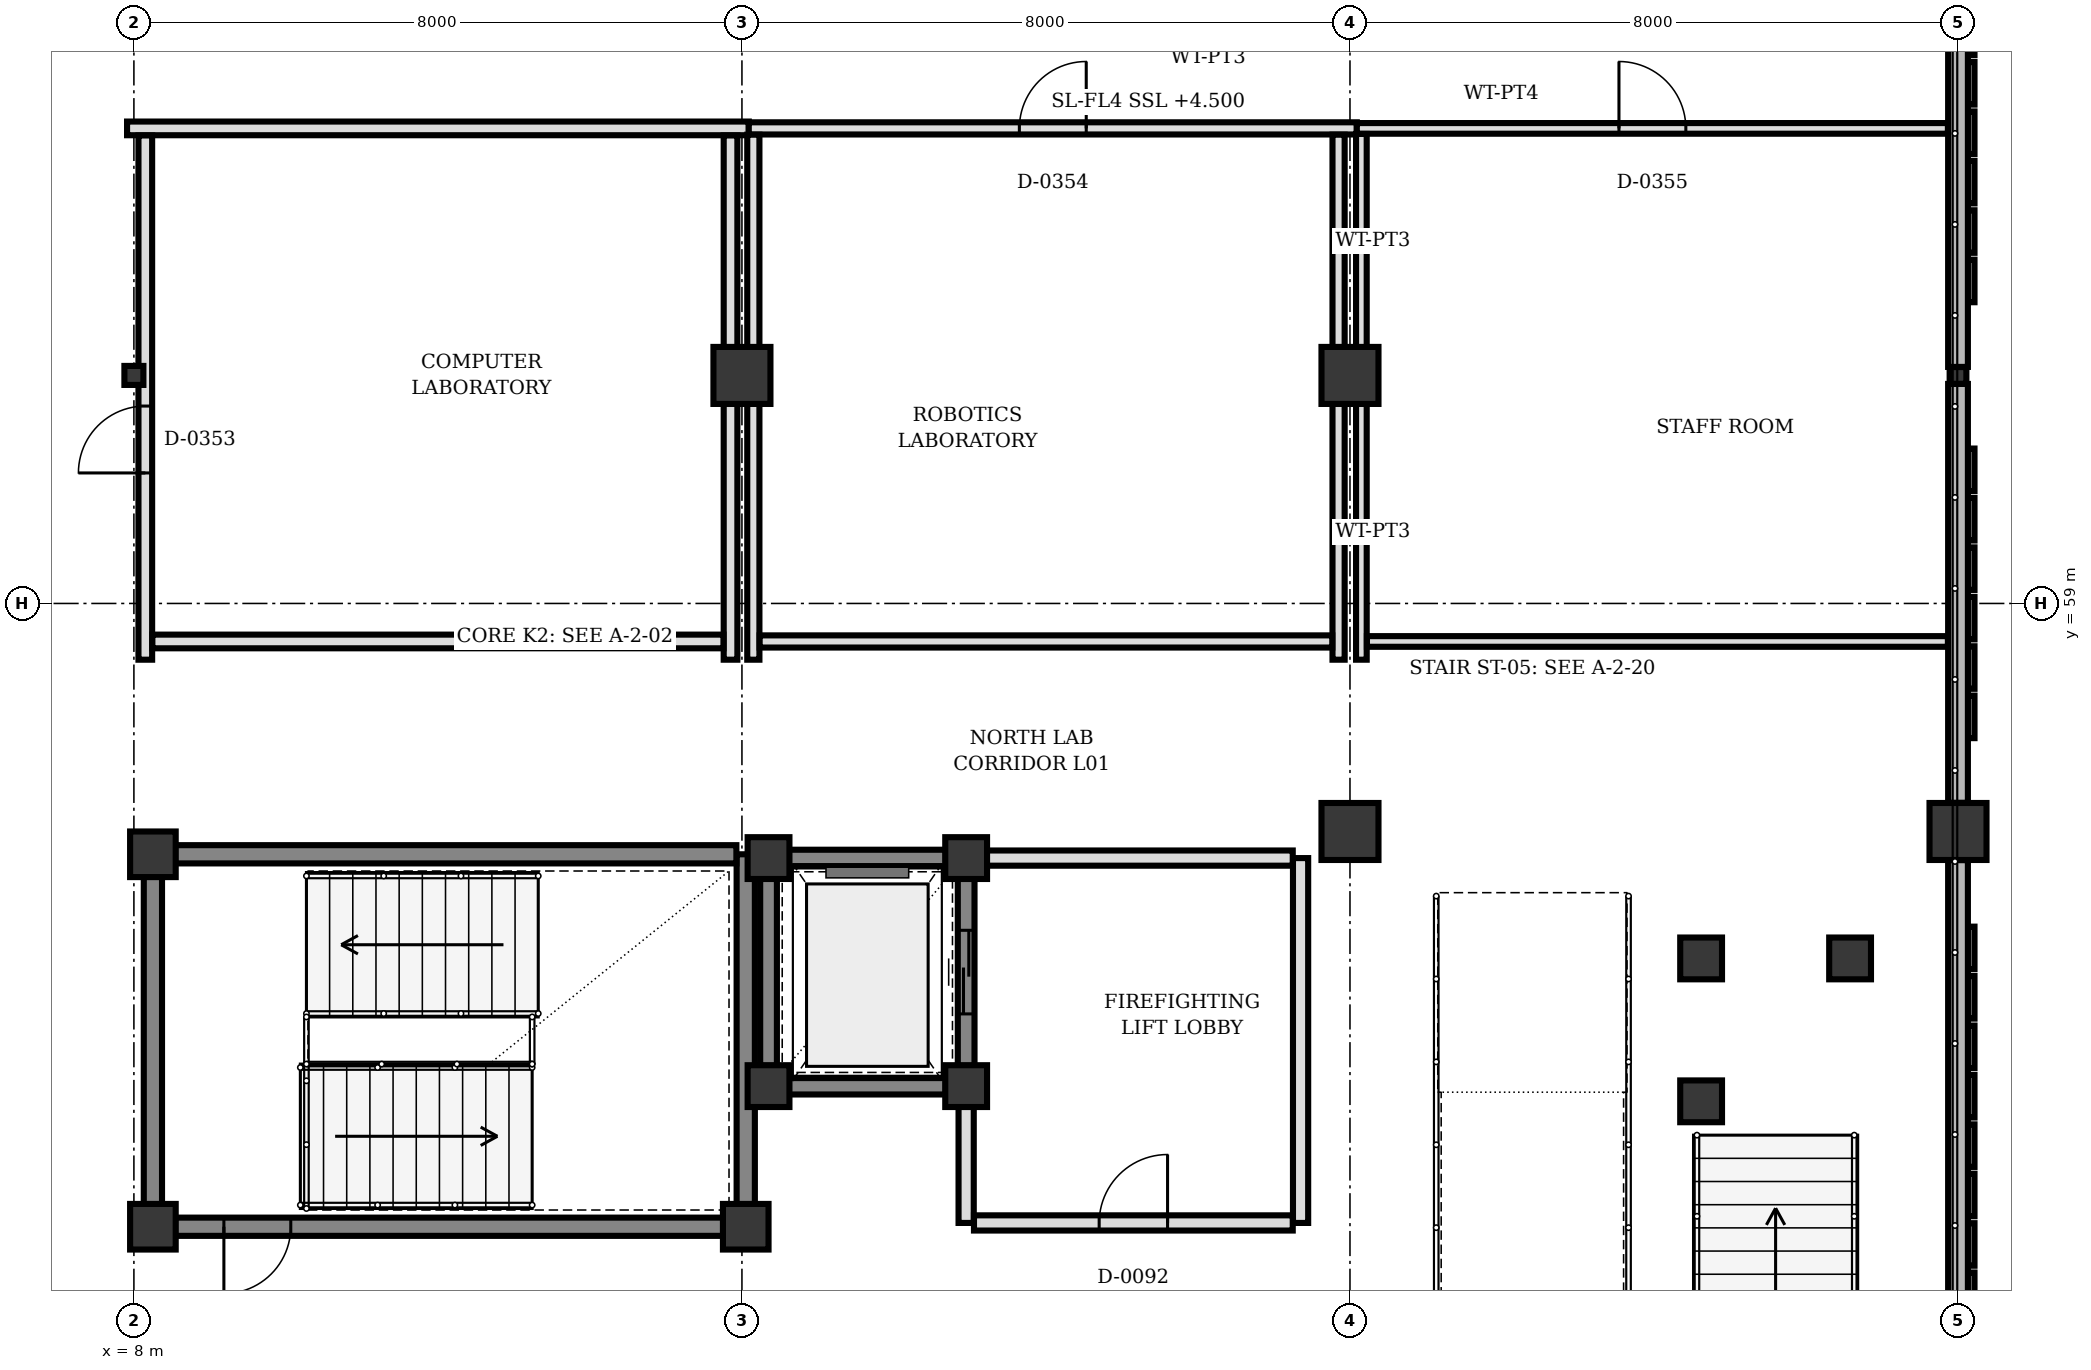
"""IFC4 building model, lengths in metres.
Left out: names, types, materials, properties, quantities, classifications, styles, units other than length and angle.
Written with IfcOpenShell. Run it as: python <this file> out.ifc"""

import sys

from ifc_helpers import new_model, si_unit, direction, frame, frame_2d, origin, origin_2d, place, context, subcontext, project, spatial, rectangle, hollow_rectangle, extrude, element, fill, save


model = new_model("IFC4")
c1 = context("Model", 3, precision=1e-05, world=origin(), true_north=direction((0.0, 1.0)))
c2 = subcontext(c1, "Body", "Model", "MODEL_VIEW")
j1 = project(units=[si_unit("LENGTHUNIT", "METRE"), si_unit("PLANEANGLEUNIT", "RADIAN")], contexts=[c1])
p1 = place(None, origin())
s1 = spatial("IfcSite", under=j1, at=p1, CompositionType="ELEMENT")
p2 = place(p1, origin())
s2 = spatial("IfcBuilding", under=s1, at=p2, CompositionType="ELEMENT")
p3 = place(p2, frame((0.0, 0.0, 4.5)))
s3 = spatial("IfcBuildingStorey", under=s2, at=p3, CompositionType="ELEMENT", Elevation=4.5)
for number, where, z_axis, x_axis in (
    (1, (8.25, 50.8, 0.0), (0.0, 0.0, 1.0), (1.0, 0.0, 0.0)),
    (2, (16.05, 50.8, 0.0), (0.0, 0.0, 1.0), (1.0, 0.0, 0.0)),
    (3, (8.25, 55.7, 0.0), (0.0, 0.0, 1.0), (1.0, 0.0, 0.0)),
):
    element("IfcColumn", number, at=place(p3, frame(where, z_axis=z_axis, x_axis=x_axis)), inside=s3, PredefinedType="COLUMN", context=c2, shape_type="SweptSolid", body=[
        extrude(rectangle(XDim=0.6, YDim=0.6, at=origin_2d()), origin(), (0.0, 0.0, 1.0), 4.0),
    ])
for number, where, z_axis, x_axis in (
    (4, (28.62, 54.33, 0.0), (0.0, 0.0, 1.0), (1.0, 0.0, 0.0)),
    (5, (30.58, 54.33, 0.0), (0.0, 0.0, 1.0), (1.0, 0.0, 0.0)),
    (6, (28.62, 52.45, 0.0), (0.0, 0.0, 1.0), (1.0, 0.0, 0.0)),
):
    element("IfcColumn", number, at=place(p3, frame(where, z_axis=z_axis, x_axis=x_axis)), inside=s3, PredefinedType="COLUMN", context=c2, shape_type="SweptSolid", body=[
        extrude(rectangle(XDim=0.55, YDim=0.55, at=origin_2d()), origin(), (0.0, 0.0, 1.0), 3.85),
    ])
for number, where, z_axis, x_axis in (
    (7, (16.35, 52.65, 0.0), (0.0, 0.0, 1.0), (1.0, 0.0, 0.0)),
    (8, (18.95, 52.65, 0.0), (0.0, 0.0, 1.0), (1.0, 0.0, 0.0)),
    (9, (18.95, 55.65, 0.0), (0.0, 0.0, 1.0), (1.0, 0.0, 0.0)),
    (10, (16.35, 55.65, 0.0), (0.0, 0.0, 1.0), (1.0, 0.0, 0.0)),
):
    element("IfcColumn", number, at=place(p3, frame(where, z_axis=z_axis, x_axis=x_axis)), inside=s3, PredefinedType="COLUMN", context=c2, shape_type="SweptSolid", body=[
        extrude(rectangle(XDim=0.55, YDim=0.55, at=origin_2d()), origin(), (0.0, 0.0, 1.0), 4.0),
    ])
for number, where, z_axis, x_axis in (
    (11, (16.0, 62.0, 0.0), (0.0, 0.0, 1.0), (1.0, 0.0, 0.0)),
    (12, (24.0, 56.0, 0.0), (0.0, 0.0, 1.0), (1.0, 0.0, 0.0)),
    (13, (24.0, 62.0, 0.0), (0.0, 0.0, 1.0), (1.0, 0.0, 0.0)),
    (14, (32.0, 56.0, 0.0), (0.0, 0.0, 1.0), (1.0, 0.0, 0.0)),
):
    element("IfcColumn", number, at=place(p3, frame(where, z_axis=z_axis, x_axis=x_axis)), inside=s3, PredefinedType="COLUMN", context=c2, shape_type="SweptSolid", body=[
        extrude(rectangle(XDim=0.75, YDim=0.75, at=origin_2d()), origin(), (0.0, 0.0, 1.0), 4.0),
    ])
p4 = place(p3, frame((32.0, 62.0, 0.0), z_axis=(0.0, 0.0, 1.0), x_axis=(1.0, 0.0, 0.0)))
e15 = element("IfcColumn", 15, at=p4, inside=s3, PredefinedType="COLUMN", context=c2, shape_type="SweptSolid", body=[
    extrude(hollow_rectangle(XDim=0.22, YDim=0.22, WallThickness=0.01, at=origin_2d()), origin(), (0.0, 0.0, 1.0), 4.0),
])
p5 = place(p3, frame((8.0, 62.0, 0.0), z_axis=(0.0, 0.0, 1.0), x_axis=(1.0, 0.0, 0.0)))
e16 = element("IfcColumn", 16, at=p5, inside=s3, PredefinedType="COLUMN", context=c2, shape_type="SweptSolid", body=[
    extrude(hollow_rectangle(XDim=0.25, YDim=0.25, WallThickness=0.01, at=origin_2d()), origin(), (0.0, 0.0, 1.0), 4.0),
])
for number, where, z_axis, x_axis in (
    (17, (32.0, 67.623, 0.0), (0.0, 0.0, 1.0), (0.0, -1.0, 0.0)),
    (18, (32.0, 61.888, 0.0), (0.0, 0.0, 1.0), (0.0, -1.0, 0.0)),
):
    element("IfcWall", number, at=place(p3, frame(where, z_axis=z_axis, x_axis=x_axis)), inside=s3, PredefinedType="SOLIDWALL", context=c2, shape_type="SweptSolid", body=[
        extrude(rectangle(XDim=5.511, YDim=0.26, at=frame_2d((2.755, 0.0))), origin(), (0.0, 0.0, 1.0), 2.982),
    ])
p6 = place(p3, frame((32.0, 55.623, 0.0), z_axis=(0.0, 0.0, 1.0), x_axis=(0.0, -1.0, 0.0)))
e19 = element("IfcWall", 19, at=p6, inside=s3, PredefinedType="SOLIDWALL", context=c2, shape_type="SweptSolid", body=[
    extrude(rectangle(XDim=7.511, YDim=0.26, at=frame_2d((3.755, 0.0))), origin(), (0.0, 0.0, 1.0), 3.132),
])
p7 = place(p3, frame((8.25, 51.092, 0.0), z_axis=(0.0, 0.0, 1.0), x_axis=(0.0, 1.0, 0.0)))
e20 = element("IfcWall", 20, at=p7, inside=s3, PredefinedType="SHEAR", context=c2, shape_type="SweptSolid", body=[
    extrude(rectangle(XDim=4.316, YDim=0.24, at=frame_2d((2.158, 0.0))), origin(), (0.0, 0.0, 1.0), 3.74),
])
p8 = place(p3, frame((16.05, 55.7, 0.0), z_axis=(0.0, 0.0, 1.0), x_axis=(0.0, -1.0, 0.0)))
e21 = element("IfcWall", 21, at=p8, inside=s3, PredefinedType="SHEAR", context=c2, shape_type="SweptSolid", body=[
    extrude(rectangle(XDim=4.608, YDim=0.24, at=frame_2d((2.304, 0.0))), origin(), (0.0, 0.0, 1.0), 3.74),
])
p9 = place(p3, frame((15.758, 50.8, 0.0), z_axis=(0.0, 0.0, 1.0), x_axis=(-1.0, 0.0, 0.0)))
e22 = element("IfcWall", 22, at=p9, inside=s3, PredefinedType="SHEAR", context=c2, shape_type="SweptSolid", body=[
    extrude(rectangle(XDim=7.216, YDim=0.24, at=frame_2d((3.608, 0.0))), origin(), (0.0, 0.0, 1.0), 3.74),
])
p10 = place(p9, frame((5.694, 0.0, 0.0)))
e23 = element("IfcOpeningElement", 23, at=p10, cuts=e22, PredefinedType="OPENING", context=c2, shape_type="SweptSolid", body=[
    extrude(rectangle(XDim=0.88, YDim=2.1, at=frame_2d((0.44, 1.05))), frame((0.0, 0.13, 0.0), z_axis=(0.0, -1.0, 0.0), x_axis=(1.0, 0.0, 0.0)), (0.0, 0.0, 1.0), 0.26),
])
p11 = place(p3, frame((15.927, 55.7, 0.0), z_axis=(0.0, 0.0, 1.0), x_axis=(-1.0, 0.0, 0.0)))
e24 = element("IfcWall", 24, at=p11, inside=s3, PredefinedType="SHEAR", context=c2, shape_type="SweptSolid", body=[
    extrude(rectangle(XDim=7.385, YDim=0.24, at=frame_2d((3.692, 0.0))), origin(), (0.0, 0.0, 1.0), 3.74),
])
p12 = place(p3, frame((16.617, 52.65, 0.0), z_axis=(0.0, 0.0, 1.0), x_axis=(1.0, 0.0, 0.0)))
e25 = element("IfcWall", 25, at=p12, inside=s3, PredefinedType="SHEAR", context=c2, shape_type="SweptSolid", body=[
    extrude(rectangle(XDim=2.066, YDim=0.22, at=frame_2d((1.033, 0.0))), origin(), (0.0, 0.0, 1.0), 3.74),
])
p13 = place(p3, frame((18.95, 52.917, 0.0), z_axis=(0.0, 0.0, 1.0), x_axis=(0.0, 1.0, 0.0)))
e26 = element("IfcWall", 26, at=p13, inside=s3, PredefinedType="SHEAR", context=c2, shape_type="SweptSolid", body=[
    extrude(rectangle(XDim=2.466, YDim=0.22, at=frame_2d((1.233, 0.0))), origin(), (0.0, 0.0, 1.0), 3.74),
])
p14 = place(p13, frame((0.683, 0.0, 0.0)))
e27 = element("IfcOpeningElement", 27, at=p14, cuts=e26, PredefinedType="OPENING", context=c2, shape_type="SweptSolid", body=[
    extrude(rectangle(XDim=1.1, YDim=2.15, at=frame_2d((0.55, 1.075))), frame((0.0, 0.12, 0.0), z_axis=(0.0, -1.0, 0.0), x_axis=(1.0, 0.0, 0.0)), (0.0, 0.0, 1.0), 0.24),
])
p15 = place(p3, frame((18.683, 55.65, 0.0), z_axis=(0.0, 0.0, 1.0), x_axis=(-1.0, 0.0, 0.0)))
e28 = element("IfcWall", 28, at=p15, inside=s3, PredefinedType="SHEAR", context=c2, shape_type="SweptSolid", body=[
    extrude(rectangle(XDim=2.066, YDim=0.22, at=frame_2d((1.033, 0.0))), origin(), (0.0, 0.0, 1.0), 3.74),
])
p16 = place(p3, frame((16.35, 55.383, 0.0), z_axis=(0.0, 0.0, 1.0), x_axis=(0.0, -1.0, 0.0)))
e29 = element("IfcWall", 29, at=p16, inside=s3, PredefinedType="SHEAR", context=c2, shape_type="SweptSolid", body=[
    extrude(rectangle(XDim=2.466, YDim=0.22, at=frame_2d((1.233, 0.0))), origin(), (0.0, 0.0, 1.0), 3.74),
])
p17 = place(p3, frame((18.95, 50.85, 0.0), z_axis=(0.0, 0.0, 1.0), x_axis=(0.0, 1.0, 0.0)))
e30 = element("IfcWall", 30, at=p17, inside=s3, PredefinedType="PARTITIONING", context=c2, shape_type="SweptSolid", body=[
    extrude(rectangle(XDim=1.533, YDim=0.2, at=frame_2d((0.767, 0.0))), origin(), (0.0, 0.0, 1.0), 3.7),
])
p18 = place(p3, frame((23.35, 50.85, 0.0), z_axis=(0.0, 0.0, 1.0), x_axis=(0.0, 1.0, 0.0)))
e31 = element("IfcWall", 31, at=p18, inside=s3, PredefinedType="PARTITIONING", context=c2, shape_type="SweptSolid", body=[
    extrude(rectangle(XDim=4.8, YDim=0.2, at=frame_2d((2.4, 0.0))), origin(), (0.0, 0.0, 1.0), 3.7),
])
p19 = place(p3, frame((19.217, 55.65, 0.0), z_axis=(0.0, 0.0, 1.0), x_axis=(1.0, 0.0, 0.0)))
e32 = element("IfcWall", 32, at=p19, inside=s3, PredefinedType="PARTITIONING", context=c2, shape_type="SweptSolid", body=[
    extrude(rectangle(XDim=4.03, YDim=0.2, at=frame_2d((2.015, 0.0))), origin(), (0.0, 0.0, 1.0), 3.7),
])
p20 = place(p3, frame((19.053, 50.85, 0.0), z_axis=(0.0, 0.0, 1.0), x_axis=(1.0, 0.0, 0.0)))
e33 = element("IfcWall", 33, at=p20, inside=s3, PredefinedType="PARTITIONING", context=c2, shape_type="SweptSolid", body=[
    extrude(rectangle(XDim=4.194, YDim=0.2, at=frame_2d((2.097, 0.0))), origin(), (0.0, 0.0, 1.0), 3.7),
])
p21 = place(p20, frame((1.647, 0.0, 0.0)))
e34 = element("IfcOpeningElement", 34, at=p21, cuts=e33, PredefinedType="OPENING", context=c2, shape_type="SweptSolid", body=[
    extrude(rectangle(XDim=0.9, YDim=2.2, at=frame_2d((0.45, 1.1))), frame((0.0, 0.11, 0.0), z_axis=(0.0, -1.0, 0.0), x_axis=(1.0, 0.0, 0.0)), (0.0, 0.0, 1.0), 0.22),
])
p22 = place(p3, frame((7.91, 65.25, 0.0), z_axis=(0.0, 0.0, 1.0), x_axis=(1.0, 0.0, 0.0)))
e35 = element("IfcWall", 35, at=p22, inside=s3, PredefinedType="PARTITIONING", context=c2, shape_type="SweptSolid", body=[
    extrude(rectangle(XDim=8.18, YDim=0.18, at=frame_2d((4.09, 0.0))), origin(), (0.0, 0.0, 1.0), 3.132),
])
p23 = place(p3, frame((15.85, 65.157, 0.0), z_axis=(0.0, 0.0, 1.0), x_axis=(0.0, -1.0, 0.0)))
e36 = element("IfcWall", 36, at=p23, inside=s3, PredefinedType="PARTITIONING", context=c2, shape_type="SweptSolid", body=[
    extrude(rectangle(XDim=2.79, YDim=0.18, at=frame_2d((1.395, 0.0))), origin(), (0.0, 0.0, 1.0), 3.132),
])
p24 = place(p3, frame((15.85, 61.633, 0.0), z_axis=(0.0, 0.0, 1.0), x_axis=(0.0, -1.0, 0.0)))
e37 = element("IfcWall", 37, at=p24, inside=s3, PredefinedType="PARTITIONING", context=c2, shape_type="SweptSolid", body=[
    extrude(rectangle(XDim=3.373, YDim=0.18, at=frame_2d((1.687, 0.0))), origin(), (0.0, 0.0, 1.0), 3.7),
])
p25 = place(p3, frame((8.15, 58.26, 0.0), z_axis=(0.0, 0.0, 1.0), x_axis=(0.0, 1.0, 0.0)))
e38 = element("IfcWall", 38, at=p25, inside=s3, PredefinedType="PARTITIONING", context=c2, shape_type="SweptSolid", body=[
    extrude(rectangle(XDim=6.897, YDim=0.18, at=frame_2d((3.448, 0.0))), origin(), (0.0, 0.0, 1.0), 2.982),
])
p26 = place(p25, frame((2.457, 0.0, 0.0)))
e39 = element("IfcOpeningElement", 39, at=p26, cuts=e38, PredefinedType="OPENING", context=c2, shape_type="SweptSolid", body=[
    extrude(rectangle(XDim=0.88, YDim=2.1, at=frame_2d((0.44, 1.05))), frame((0.0, 0.1, 0.0), z_axis=(0.0, -1.0, 0.0), x_axis=(1.0, 0.0, 0.0)), (0.0, 0.0, 1.0), 0.2),
])
p27 = place(p3, frame((15.757, 58.5, 0.0), z_axis=(0.0, 0.0, 1.0), x_axis=(-1.0, 0.0, 0.0)))
e40 = element("IfcWall", 40, at=p27, inside=s3, PredefinedType="PARTITIONING", context=c2, shape_type="SweptSolid", body=[
    extrude(rectangle(XDim=7.514, YDim=0.18, at=frame_2d((3.757, 0.0))), origin(), (0.0, 0.0, 1.0), 3.7),
])
p28 = place(p3, frame((16.09, 65.25, 0.0), z_axis=(0.0, 0.0, 1.0), x_axis=(1.0, 0.0, 0.0)))
e41 = element("IfcWall", 41, at=p28, inside=s3, PredefinedType="PARTITIONING", context=c2, shape_type="SweptSolid", body=[
    extrude(rectangle(XDim=8.0, YDim=0.16, at=frame_2d((4.0, 0.0))), origin(), (0.0, 0.0, 1.0), 3.132),
])
p29 = place(p28, frame((3.56, 0.0, 0.0)))
e42 = element("IfcOpeningElement", 42, at=p29, cuts=e41, PredefinedType="OPENING", context=c2, shape_type="SweptSolid", body=[
    extrude(rectangle(XDim=0.88, YDim=2.1, at=frame_2d((0.44, 1.05))), frame((0.0, 0.09, 0.0), z_axis=(0.0, -1.0, 0.0), x_axis=(1.0, 0.0, 0.0)), (0.0, 0.0, 1.0), 0.18),
])
p30 = place(p3, frame((23.85, 65.167, 0.0), z_axis=(0.0, 0.0, 1.0), x_axis=(0.0, -1.0, 0.0)))
e43 = element("IfcWall", 43, at=p30, inside=s3, PredefinedType="PARTITIONING", context=c2, shape_type="SweptSolid", body=[
    extrude(rectangle(XDim=2.8, YDim=0.16, at=frame_2d((1.4, 0.0))), origin(), (0.0, 0.0, 1.0), 3.132),
])
p31 = place(p3, frame((23.85, 61.633, 0.0), z_axis=(0.0, 0.0, 1.0), x_axis=(0.0, -1.0, 0.0)))
e44 = element("IfcWall", 44, at=p31, inside=s3, PredefinedType="PARTITIONING", context=c2, shape_type="SweptSolid", body=[
    extrude(rectangle(XDim=3.373, YDim=0.16, at=frame_2d((1.687, 0.0))), origin(), (0.0, 0.0, 1.0), 3.132),
])
p32 = place(p3, frame((16.15, 58.26, 0.0), z_axis=(0.0, 0.0, 1.0), x_axis=(0.0, 1.0, 0.0)))
e45 = element("IfcWall", 45, at=p32, inside=s3, PredefinedType="PARTITIONING", context=c2, shape_type="SweptSolid", body=[
    extrude(rectangle(XDim=3.373, YDim=0.16, at=frame_2d((1.687, 0.0))), origin(), (0.0, 0.0, 1.0), 3.7),
])
p33 = place(p3, frame((16.15, 62.367, 0.0), z_axis=(0.0, 0.0, 1.0), x_axis=(0.0, 1.0, 0.0)))
e46 = element("IfcWall", 46, at=p33, inside=s3, PredefinedType="PARTITIONING", context=c2, shape_type="SweptSolid", body=[
    extrude(rectangle(XDim=2.8, YDim=0.16, at=frame_2d((1.4, 0.0))), origin(), (0.0, 0.0, 1.0), 3.132),
])
p34 = place(p3, frame((23.767, 58.5, 0.0), z_axis=(0.0, 0.0, 1.0), x_axis=(-1.0, 0.0, 0.0)))
e47 = element("IfcWall", 47, at=p34, inside=s3, PredefinedType="PARTITIONING", context=c2, shape_type="SweptSolid", body=[
    extrude(rectangle(XDim=7.534, YDim=0.16, at=frame_2d((3.767, 0.0))), origin(), (0.0, 0.0, 1.0), 3.132),
])
p35 = place(p3, frame((24.09, 65.25, 0.0), z_axis=(0.0, 0.0, 1.0), x_axis=(1.0, 0.0, 0.0)))
e48 = element("IfcWall", 48, at=p35, inside=s3, PredefinedType="PARTITIONING", context=c2, shape_type="SweptSolid", body=[
    extrude(rectangle(XDim=7.777, YDim=0.14, at=frame_2d((3.888, 0.0))), origin(), (0.0, 0.0, 1.0), 3.132),
])
p36 = place(p35, frame((3.449, 0.0, 0.0)))
e49 = element("IfcOpeningElement", 49, at=p36, cuts=e48, PredefinedType="OPENING", context=c2, shape_type="SweptSolid", body=[
    extrude(rectangle(XDim=0.88, YDim=2.1, at=frame_2d((0.44, 1.05))), frame((0.0, 0.08, 0.0), z_axis=(0.0, -1.0, 0.0), x_axis=(1.0, 0.0, 0.0)), (0.0, 0.0, 1.0), 0.16),
])
p37 = place(p3, frame((24.15, 58.26, 0.0), z_axis=(0.0, 0.0, 1.0), x_axis=(0.0, 1.0, 0.0)))
e50 = element("IfcWall", 50, at=p37, inside=s3, PredefinedType="PARTITIONING", context=c2, shape_type="SweptSolid", body=[
    extrude(rectangle(XDim=3.373, YDim=0.14, at=frame_2d((1.687, 0.0))), origin(), (0.0, 0.0, 1.0), 3.132),
])
p38 = place(p3, frame((24.15, 62.367, 0.0), z_axis=(0.0, 0.0, 1.0), x_axis=(0.0, 1.0, 0.0)))
e51 = element("IfcWall", 51, at=p38, inside=s3, PredefinedType="PARTITIONING", context=c2, shape_type="SweptSolid", body=[
    extrude(rectangle(XDim=2.81, YDim=0.14, at=frame_2d((1.405, 0.0))), origin(), (0.0, 0.0, 1.0), 3.132),
])
p39 = place(p3, frame((31.867, 58.5, 0.0), z_axis=(0.0, 0.0, 1.0), x_axis=(-1.0, 0.0, 0.0)))
e52 = element("IfcWall", 52, at=p39, inside=s3, PredefinedType="PARTITIONING", context=c2, shape_type="SweptSolid", body=[
    extrude(rectangle(XDim=7.644, YDim=0.14, at=frame_2d((3.822, 0.0))), origin(), (0.0, 0.0, 1.0), 3.132),
])
p40 = place(p10, origin())
e53 = element("IfcDoor", 53, at=p40, inside=s3, OperationType="SINGLE_SWING_RIGHT", PredefinedType="DOOR", context=c2, shape_type="SweptSolid", body=[
    extrude(rectangle(XDim=0.88, YDim=2.1, at=frame_2d((0.44, 1.05))), frame((0.0, 0.025, 0.0), z_axis=(0.0, -1.0, 0.0), x_axis=(1.0, 0.0, 0.0)), (0.0, 0.0, 1.0), 0.05),
])
fill(e23, e53)
p41 = place(p14, origin())
e54 = element("IfcDoor", 54, at=p41, inside=s3, OperationType="DOUBLE_DOOR_SLIDING", PredefinedType="DOOR", context=c2, shape_type="SweptSolid", body=[
    extrude(rectangle(XDim=1.1, YDim=2.15, at=frame_2d((0.55, 1.075))), frame((0.0, 0.025, 0.0), z_axis=(0.0, -1.0, 0.0), x_axis=(1.0, 0.0, 0.0)), (0.0, 0.0, 1.0), 0.05),
])
fill(e27, e54)
p42 = place(p21, origin())
e55 = element("IfcDoor", 55, at=p42, inside=s3, OperationType="SINGLE_SWING_RIGHT", PredefinedType="DOOR", context=c2, shape_type="SweptSolid", body=[
    extrude(rectangle(XDim=0.9, YDim=2.2, at=frame_2d((0.45, 1.1))), frame((0.0, 0.025, 0.0), z_axis=(0.0, -1.0, 0.0), x_axis=(1.0, 0.0, 0.0)), (0.0, 0.0, 1.0), 0.05),
])
fill(e34, e55)
p43 = place(p26, origin())
e56 = element("IfcDoor", 56, at=p43, inside=s3, OperationType="SINGLE_SWING_LEFT", PredefinedType="DOOR", context=c2, shape_type="SweptSolid", body=[
    extrude(rectangle(XDim=0.88, YDim=2.1, at=frame_2d((0.44, 1.05))), frame((0.0, 0.025, 0.0), z_axis=(0.0, -1.0, 0.0), x_axis=(1.0, 0.0, 0.0)), (0.0, 0.0, 1.0), 0.05),
])
fill(e39, e56)
p44 = place(p29, origin())
e57 = element("IfcDoor", 57, at=p44, inside=s3, OperationType="SINGLE_SWING_RIGHT", PredefinedType="DOOR", context=c2, shape_type="SweptSolid", body=[
    extrude(rectangle(XDim=0.88, YDim=2.1, at=frame_2d((0.44, 1.05))), frame((0.0, 0.025, 0.0), z_axis=(0.0, -1.0, 0.0), x_axis=(1.0, 0.0, 0.0)), (0.0, 0.0, 1.0), 0.05),
])
fill(e42, e57)
p45 = place(p36, origin())
e58 = element("IfcDoor", 58, at=p45, inside=s3, OperationType="SINGLE_SWING_LEFT", PredefinedType="DOOR", context=c2, shape_type="SweptSolid", body=[
    extrude(rectangle(XDim=0.88, YDim=2.1, at=frame_2d((0.44, 1.05))), frame((0.0, 0.025, 0.0), z_axis=(0.0, -1.0, 0.0), x_axis=(1.0, 0.0, 0.0)), (0.0, 0.0, 1.0), 0.05),
])
fill(e49, e58)
save(model, sys.argv[1])
